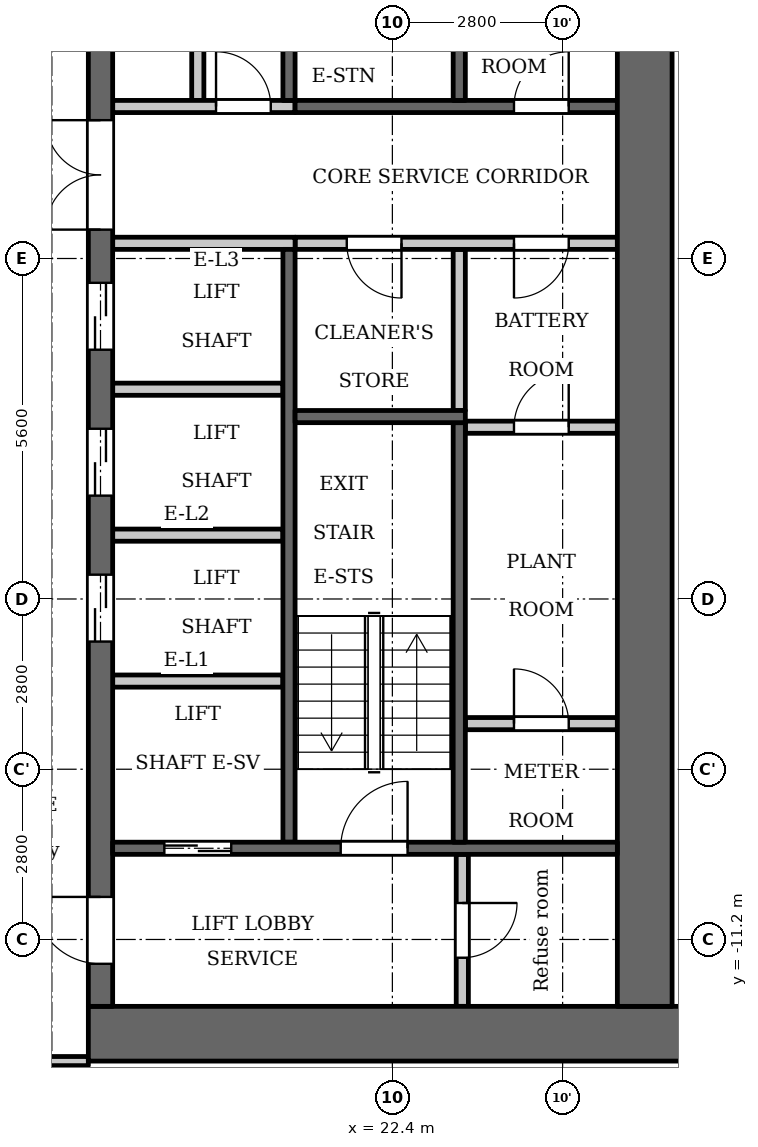
"""IFC4 building model, lengths in metres.
Left out: names, types, materials, properties, quantities, classifications, styles, units other than length and angle.
Written with IfcOpenShell. Run it as: python <this file> out.ifc"""

import sys

from ifc_helpers import new_model, si_unit, direction, frame, frame_2d, origin, place, context, subcontext, project, spatial, rectangle, extrude, element, fill, save


model = new_model("IFC4")
c1 = context("Model", 3, precision=1e-05, world=origin(), true_north=direction((0.0, 1.0)))
c2 = subcontext(c1, "Body", "Model", "MODEL_VIEW")
j1 = project(units=[si_unit("LENGTHUNIT", "METRE"), si_unit("PLANEANGLEUNIT", "RADIAN")], contexts=[c1])
p1 = place(None, origin())
s1 = spatial("IfcSite", under=j1, at=p1, CompositionType="ELEMENT")
p2 = place(p1, origin())
s2 = spatial("IfcBuilding", under=s1, at=p2, CompositionType="ELEMENT")
p3 = place(p2, frame((0.0, 0.0, 44.5)))
s3 = spatial("IfcBuildingStorey", under=s2, at=p3, CompositionType="ELEMENT", Elevation=44.5)
p4 = place(p3, frame((23.5, -2.5, 0.0), z_axis=(0.0, 0.0, 1.0), x_axis=(0.0, 1.0, 0.0)))
e1 = element("IfcWall", 1, at=p4, inside=s3, PredefinedType="PARTITIONING", context=c2, shape_type="SweptSolid", body=[
    extrude(rectangle(XDim=2.65, YDim=0.2, at=frame_2d((1.325, 0.0))), origin(), (0.0, 0.0, 1.0), 3.2),
])
p5 = place(p3, frame((20.7, 2.6, 0.0), z_axis=(0.0, 0.0, 1.0), x_axis=(0.0, 1.0, 0.0)))
e2 = element("IfcWall", 2, at=p5, inside=s3, PredefinedType="SHEAR", context=c2, shape_type="SweptSolid", body=[
    extrude(rectangle(XDim=7.0, YDim=0.2, at=frame_2d((3.5, 0.0))), origin(), (0.0, 0.0, 1.0), 3.2),
])
p6 = place(p3, frame((20.7, -9.6, 0.0), z_axis=(0.0, 0.0, 1.0), x_axis=(0.0, 1.0, 0.0)))
e3 = element("IfcWall", 3, at=p6, inside=s3, PredefinedType="SHEAR", context=c2, shape_type="SweptSolid", body=[
    extrude(rectangle(XDim=9.75, YDim=0.2, at=frame_2d((4.875, 0.0))), origin(), (0.0, 0.0, 1.0), 3.2),
])
p7 = place(p3, frame((20.8, 2.5, 0.0), z_axis=(0.0, 0.0, 1.0), x_axis=(1.0, 0.0, 0.0)))
e4 = element("IfcWall", 4, at=p7, inside=s3, PredefinedType="SHEAR", context=c2, shape_type="SweptSolid", body=[
    extrude(rectangle(XDim=5.3, YDim=0.2, at=frame_2d((2.65, 0.0))), origin(), (0.0, 0.0, 1.0), 3.2),
])
p8 = place(p7, frame((3.6, 0.0, 0.0)))
e5 = element("IfcOpeningElement", 5, at=p8, cuts=e4, PredefinedType="OPENING", context=c2, shape_type="SweptSolid", body=[
    extrude(rectangle(XDim=0.9, YDim=2.1, at=frame_2d((0.45, 1.05))), frame((0.0, 0.11, 0.0), z_axis=(0.0, -1.0, 0.0), x_axis=(1.0, 0.0, 0.0)), (0.0, 0.0, 1.0), 0.22),
])
p9 = place(p3, frame((20.8, 0.25, 0.0), z_axis=(0.0, 0.0, 1.0), x_axis=(1.0, 0.0, 0.0)))
e6 = element("IfcWall", 6, at=p9, inside=s3, PredefinedType="PARTITIONING", context=c2, shape_type="SweptSolid", body=[
    extrude(rectangle(XDim=5.3, YDim=0.2, at=frame_2d((2.65, 0.0))), origin(), (0.0, 0.0, 1.0), 3.2),
])
p10 = place(p9, frame((0.85, 0.0, 0.0)))
e7 = element("IfcOpeningElement", 7, at=p10, cuts=e6, PredefinedType="OPENING", context=c2, shape_type="SweptSolid", body=[
    extrude(rectangle(XDim=0.9, YDim=2.1, at=frame_2d((0.45, 1.05))), frame((0.0, 0.11, 0.0), z_axis=(0.0, -1.0, 0.0), x_axis=(1.0, 0.0, 0.0)), (0.0, 0.0, 1.0), 0.22),
])
p11 = place(p9, frame((3.6, 0.0, 0.0)))
e8 = element("IfcOpeningElement", 8, at=p11, cuts=e6, PredefinedType="OPENING", context=c2, shape_type="SweptSolid", body=[
    extrude(rectangle(XDim=0.9, YDim=2.1, at=frame_2d((0.45, 1.05))), frame((0.0, 0.11, 0.0), z_axis=(0.0, -1.0, 0.0), x_axis=(1.0, 0.0, 0.0)), (0.0, 0.0, 1.0), 0.22),
])
p12 = place(p3, frame((17.4, -12.75, 0.0), z_axis=(0.0, 0.0, 1.0), x_axis=(1.0, 0.0, 0.0)))
e9 = element("IfcWall", 9, at=p12, inside=s3, PredefinedType="SHEAR", context=c2, shape_type="SweptSolid", body=[
    extrude(rectangle(XDim=10.4, YDim=0.9, at=frame_2d((5.2, 0.0))), origin(), (0.0, 0.0, 1.0), 3.2),
])
p13 = place(p3, frame((19.2, 2.6, 0.0), z_axis=(0.0, 0.0, 1.0), x_axis=(0.0, 1.0, 0.0)))
e10 = element("IfcWall", 10, at=p13, inside=s3, PredefinedType="PARTITIONING", context=c2, shape_type="SweptSolid", body=[
    extrude(rectangle(XDim=4.6, YDim=0.2, at=frame_2d((2.3, 0.0))), origin(), (0.0, 0.0, 1.0), 3.2),
])
p14 = place(p3, frame((17.6, -12.3, 0.0), z_axis=(0.0, 0.0, 1.0), x_axis=(0.0, 1.0, 0.0)))
e11 = element("IfcWall", 11, at=p14, inside=s3, PredefinedType="SHEAR", context=c2, shape_type="SweptSolid", body=[
    extrude(rectangle(XDim=24.6, YDim=0.4, at=frame_2d((12.3, 0.0))), origin(), (0.0, 0.0, 1.0), 3.2),
])
p15 = place(p14, frame((6.0, 0.0, 0.0)))
e12 = element("IfcOpeningElement", 12, at=p15, cuts=e11, PredefinedType="OPENING", context=c2, shape_type="SweptSolid", body=[
    extrude(rectangle(XDim=1.1, YDim=2.1, at=frame_2d((0.55, 1.05))), frame((0.0, 0.21, 0.0), z_axis=(0.0, -1.0, 0.0), x_axis=(1.0, 0.0, 0.0)), (0.0, 0.0, 1.0), 0.42),
])
p16 = place(p14, frame((8.4, 0.0, 0.0)))
e13 = element("IfcOpeningElement", 13, at=p16, cuts=e11, PredefinedType="OPENING", context=c2, shape_type="SweptSolid", body=[
    extrude(rectangle(XDim=1.1, YDim=2.1, at=frame_2d((0.55, 1.05))), frame((0.0, 0.21, 0.0), z_axis=(0.0, -1.0, 0.0), x_axis=(1.0, 0.0, 0.0)), (0.0, 0.0, 1.0), 0.42),
])
p17 = place(p14, frame((10.8, 0.0, 0.0)))
e14 = element("IfcOpeningElement", 14, at=p17, cuts=e11, PredefinedType="OPENING", context=c2, shape_type="SweptSolid", body=[
    extrude(rectangle(XDim=1.1, YDim=2.1, at=frame_2d((0.55, 1.05))), frame((0.0, 0.21, 0.0), z_axis=(0.0, -1.0, 0.0), x_axis=(1.0, 0.0, 0.0)), (0.0, 0.0, 1.0), 0.42),
])
p18 = place(p14, frame((16.75, 0.0, 0.0)))
e15 = element("IfcOpeningElement", 15, at=p18, cuts=e11, PredefinedType="OPENING", context=c2, shape_type="SweptSolid", body=[
    extrude(rectangle(XDim=0.9, YDim=2.1, at=frame_2d((0.45, 1.05))), frame((0.0, 0.21, 0.0), z_axis=(0.0, -1.0, 0.0), x_axis=(1.0, 0.0, 0.0)), (0.0, 0.0, 1.0), 0.42),
])
p19 = place(p14, frame((22.8, 0.0, 0.0)))
e16 = element("IfcOpeningElement", 16, at=p19, cuts=e11, PredefinedType="OPENING", context=c2, shape_type="SweptSolid", body=[
    extrude(rectangle(XDim=1.1, YDim=2.1, at=frame_2d((0.55, 1.05))), frame((0.0, 0.21, 0.0), z_axis=(0.0, -1.0, 0.0), x_axis=(1.0, 0.0, 0.0)), (0.0, 0.0, 1.0), 0.42),
])
p20 = place(p14, frame((0.7, 0.0, 0.0)))
e17 = element("IfcOpeningElement", 17, at=p20, cuts=e11, PredefinedType="OPENING", context=c2, shape_type="SweptSolid", body=[
    extrude(rectangle(XDim=1.1, YDim=2.1, at=frame_2d((0.55, 1.05))), frame((0.0, 0.21, 0.0), z_axis=(0.0, -1.0, 0.0), x_axis=(1.0, 0.0, 0.0)), (0.0, 0.0, 1.0), 0.42),
])
p21 = place(p14, frame((12.775, 0.0, 0.0)))
e18 = element("IfcOpeningElement", 18, at=p21, cuts=e11, PredefinedType="OPENING", context=c2, shape_type="SweptSolid", body=[
    extrude(rectangle(XDim=1.8, YDim=2.1, at=frame_2d((0.9, 1.05))), frame((0.0, 0.21, 0.0), z_axis=(0.0, -1.0, 0.0), x_axis=(1.0, 0.0, 0.0)), (0.0, 0.0, 1.0), 0.42),
])
p22 = place(p3, frame((26.55, -12.3, 0.0), z_axis=(0.0, 0.0, 1.0), x_axis=(0.0, 1.0, 0.0)))
e19 = element("IfcWall", 19, at=p22, inside=s3, PredefinedType="SHEAR", context=c2, shape_type="SweptSolid", body=[
    extrude(rectangle(XDim=24.6, YDim=0.9, at=frame_2d((12.3, 0.0))), origin(), (0.0, 0.0, 1.0), 3.2),
])
p23 = place(p3, frame((23.55, -12.3, 0.0), z_axis=(0.0, 0.0, 1.0), x_axis=(0.0, 1.0, 0.0)))
e20 = element("IfcWall", 20, at=p23, inside=s3, PredefinedType="PARTITIONING", context=c2, shape_type="SweptSolid", body=[
    extrude(rectangle(XDim=2.5, YDim=0.2, at=frame_2d((1.25, 0.0))), origin(), (0.0, 0.0, 1.0), 3.2),
])
p24 = place(p23, frame((0.8, 0.0, 0.0)))
e21 = element("IfcOpeningElement", 21, at=p24, cuts=e20, PredefinedType="OPENING", context=c2, shape_type="SweptSolid", body=[
    extrude(rectangle(XDim=0.9, YDim=2.1, at=frame_2d((0.45, 1.05))), frame((0.0, 0.11, 0.0), z_axis=(0.0, -1.0, 0.0), x_axis=(1.0, 0.0, 0.0)), (0.0, 0.0, 1.0), 0.22),
])
p25 = place(p3, frame((23.6, -7.65, 0.0), z_axis=(0.0, 0.0, 1.0), x_axis=(1.0, 0.0, 0.0)))
e22 = element("IfcWall", 22, at=p25, inside=s3, PredefinedType="PARTITIONING", context=c2, shape_type="SweptSolid", body=[
    extrude(rectangle(XDim=2.5, YDim=0.2, at=frame_2d((1.25, 0.0))), origin(), (0.0, 0.0, 1.0), 3.2),
])
p26 = place(p25, frame((0.8, 0.0, 0.0)))
e23 = element("IfcOpeningElement", 23, at=p26, cuts=e22, PredefinedType="OPENING", context=c2, shape_type="SweptSolid", body=[
    extrude(rectangle(XDim=0.9, YDim=2.1, at=frame_2d((0.45, 1.05))), frame((0.0, 0.11, 0.0), z_axis=(0.0, -1.0, 0.0), x_axis=(1.0, 0.0, 0.0)), (0.0, 0.0, 1.0), 0.22),
])
p27 = place(p3, frame((23.6, -2.775, 0.0), z_axis=(0.0, 0.0, 1.0), x_axis=(1.0, 0.0, 0.0)))
e24 = element("IfcWall", 24, at=p27, inside=s3, PredefinedType="PARTITIONING", context=c2, shape_type="SweptSolid", body=[
    extrude(rectangle(XDim=2.5, YDim=0.2, at=frame_2d((1.25, 0.0))), origin(), (0.0, 0.0, 1.0), 3.2),
])
p28 = place(p27, frame((0.8, 0.0, 0.0)))
e25 = element("IfcOpeningElement", 25, at=p28, cuts=e24, PredefinedType="OPENING", context=c2, shape_type="SweptSolid", body=[
    extrude(rectangle(XDim=0.9, YDim=2.1, at=frame_2d((0.45, 1.05))), frame((0.0, 0.11, 0.0), z_axis=(0.0, -1.0, 0.0), x_axis=(1.0, 0.0, 0.0)), (0.0, 0.0, 1.0), 0.22),
])
p29 = place(p3, frame((17.8, -9.7, 0.0), z_axis=(0.0, 0.0, 1.0), x_axis=(1.0, 0.0, 0.0)))
e26 = element("IfcWall", 26, at=p29, inside=s3, PredefinedType="SHEAR", context=c2, shape_type="SweptSolid", body=[
    extrude(rectangle(XDim=8.3, YDim=0.2, at=frame_2d((4.15, 0.0))), origin(), (0.0, 0.0, 1.0), 3.2),
])
p30 = place(p29, frame((0.85, 0.0, 0.0)))
e27 = element("IfcOpeningElement", 27, at=p30, cuts=e26, PredefinedType="OPENING", context=c2, shape_type="SweptSolid", body=[
    extrude(rectangle(XDim=1.1, YDim=2.1, at=frame_2d((0.55, 1.05))), frame((0.0, 0.11, 0.0), z_axis=(0.0, -1.0, 0.0), x_axis=(1.0, 0.0, 0.0)), (0.0, 0.0, 1.0), 0.22),
])
p31 = place(p29, frame((3.75, 0.0, 0.0)))
e28 = element("IfcOpeningElement", 28, at=p31, cuts=e26, PredefinedType="OPENING", context=c2, shape_type="SweptSolid", body=[
    extrude(rectangle(XDim=1.1, YDim=2.1, at=frame_2d((0.55, 1.05))), frame((0.0, 0.11, 0.0), z_axis=(0.0, -1.0, 0.0), x_axis=(1.0, 0.0, 0.0)), (0.0, 0.0, 1.0), 0.22),
])
for number, where, z_axis, x_axis in (
    (29, (17.8, -6.95, 0.0), (0.0, 0.0, 1.0), (1.0, 0.0, 0.0)),
    (30, (17.8, -4.55, 0.0), (0.0, 0.0, 1.0), (1.0, 0.0, 0.0)),
    (31, (17.8, -2.15, 0.0), (0.0, 0.0, 1.0), (1.0, 0.0, 0.0)),
):
    element("IfcWall", number, at=place(p3, frame(where, z_axis=z_axis, x_axis=x_axis)), inside=s3, PredefinedType="PARTITIONING", context=c2, shape_type="SweptSolid", body=[
        extrude(rectangle(XDim=2.8, YDim=0.2, at=frame_2d((1.4, 0.0))), origin(), (0.0, 0.0, 1.0), 3.2),
    ])
p32 = place(p3, frame((17.8, 0.25, 0.0), z_axis=(0.0, 0.0, 1.0), x_axis=(1.0, 0.0, 0.0)))
e32 = element("IfcWall", 32, at=p32, inside=s3, PredefinedType="PARTITIONING", context=c2, shape_type="SweptSolid", body=[
    extrude(rectangle(XDim=3.0, YDim=0.2, at=frame_2d((1.5, 0.0))), origin(), (0.0, 0.0, 1.0), 3.2),
])
p33 = place(p3, frame((17.8, 2.5, 0.0), z_axis=(0.0, 0.0, 1.0), x_axis=(1.0, 0.0, 0.0)))
e33 = element("IfcWall", 33, at=p33, inside=s3, PredefinedType="PARTITIONING", context=c2, shape_type="SweptSolid", body=[
    extrude(rectangle(XDim=3.0, YDim=0.2, at=frame_2d((1.5, 0.0))), origin(), (0.0, 0.0, 1.0), 3.2),
])
p34 = place(p33, frame((1.7, 0.0, 0.0)))
e34 = element("IfcOpeningElement", 34, at=p34, cuts=e33, PredefinedType="OPENING", context=c2, shape_type="SweptSolid", body=[
    extrude(rectangle(XDim=0.9, YDim=2.1, at=frame_2d((0.45, 1.05))), frame((0.0, 0.11, 0.0), z_axis=(0.0, -1.0, 0.0), x_axis=(1.0, 0.0, 0.0)), (0.0, 0.0, 1.0), 0.22),
])
p35 = place(p3, frame((23.5, 2.6, 0.0), z_axis=(0.0, 0.0, 1.0), x_axis=(0.0, 1.0, 0.0)))
e35 = element("IfcWall", 35, at=p35, inside=s3, PredefinedType="SHEAR", context=c2, shape_type="SweptSolid", body=[
    extrude(rectangle(XDim=7.0, YDim=0.2, at=frame_2d((3.5, 0.0))), origin(), (0.0, 0.0, 1.0), 3.2),
])
p36 = place(p3, frame((23.5, -9.6, 0.0), z_axis=(0.0, 0.0, 1.0), x_axis=(0.0, 1.0, 0.0)))
e36 = element("IfcWall", 36, at=p36, inside=s3, PredefinedType="SHEAR", context=c2, shape_type="SweptSolid", body=[
    extrude(rectangle(XDim=6.9, YDim=0.2, at=frame_2d((3.45, 0.0))), origin(), (0.0, 0.0, 1.0), 3.2),
])
p37 = place(p3, frame((20.8, -2.6, 0.0), z_axis=(0.0, 0.0, 1.0), x_axis=(1.0, 0.0, 0.0)))
e37 = element("IfcWall", 37, at=p37, inside=s3, PredefinedType="SHEAR", context=c2, shape_type="SweptSolid", body=[
    extrude(rectangle(XDim=2.8, YDim=0.2, at=frame_2d((1.4, 0.0))), origin(), (0.0, 0.0, 1.0), 3.2),
])
p38 = place(p3, frame((-17.4, -13.2, 0.0), z_axis=(0.0, 0.0, 1.0), x_axis=(1.0, 0.0, 0.0)))
e38 = element("IfcWall", 38, at=p38, inside=s3, PredefinedType="PARTITIONING", context=c2, shape_type="SweptSolid", body=[
    extrude(rectangle(XDim=34.8, YDim=0.15, at=frame_2d((17.4, 0.0))), origin(), (0.0, 0.0, 1.0), 3.2),
])
p39 = place(p38, frame((0.65, 0.0, 0.0)))
e39 = element("IfcOpeningElement", 39, at=p39, cuts=e38, PredefinedType="OPENING", context=c2, shape_type="SweptSolid", body=[
    extrude(rectangle(XDim=1.0, YDim=2.1, at=frame_2d((0.5, 1.05))), frame((0.0, 0.085, 0.0), z_axis=(0.0, -1.0, 0.0), x_axis=(1.0, 0.0, 0.0)), (0.0, 0.0, 1.0), 0.17),
])
p40 = place(p38, frame((33.05, 0.0, 0.0)))
e40 = element("IfcOpeningElement", 40, at=p40, cuts=e38, PredefinedType="OPENING", context=c2, shape_type="SweptSolid", body=[
    extrude(rectangle(XDim=1.0, YDim=2.1, at=frame_2d((0.5, 1.05))), frame((0.0, 0.085, 0.0), z_axis=(0.0, -1.0, 0.0), x_axis=(1.0, 0.0, 0.0)), (0.0, 0.0, 1.0), 0.17),
])
p41 = place(p38, frame((4.55, 0.0, 0.0)))
e41 = element("IfcOpeningElement", 41, at=p41, cuts=e38, PredefinedType="OPENING", context=c2, shape_type="SweptSolid", body=[
    extrude(rectangle(XDim=1.0, YDim=2.1, at=frame_2d((0.5, 1.05))), frame((0.0, 0.085, 0.0), z_axis=(0.0, -1.0, 0.0), x_axis=(1.0, 0.0, 0.0)), (0.0, 0.0, 1.0), 0.17),
])
p42 = place(p38, frame((6.9, 0.0, 0.0)))
e42 = element("IfcOpeningElement", 42, at=p42, cuts=e38, PredefinedType="OPENING", context=c2, shape_type="SweptSolid", body=[
    extrude(rectangle(XDim=1.0, YDim=2.1, at=frame_2d((0.5, 1.05))), frame((0.0, 0.085, 0.0), z_axis=(0.0, -1.0, 0.0), x_axis=(1.0, 0.0, 0.0)), (0.0, 0.0, 1.0), 0.17),
])
p43 = place(p38, frame((15.75, 0.0, 0.0)))
e43 = element("IfcOpeningElement", 43, at=p43, cuts=e38, PredefinedType="OPENING", context=c2, shape_type="SweptSolid", body=[
    extrude(rectangle(XDim=1.0, YDim=2.1, at=frame_2d((0.5, 1.05))), frame((0.0, 0.085, 0.0), z_axis=(0.0, -1.0, 0.0), x_axis=(1.0, 0.0, 0.0)), (0.0, 0.0, 1.0), 0.17),
])
p44 = place(p38, frame((18.1, 0.0, 0.0)))
e44 = element("IfcOpeningElement", 44, at=p44, cuts=e38, PredefinedType="OPENING", context=c2, shape_type="SweptSolid", body=[
    extrude(rectangle(XDim=1.0, YDim=2.1, at=frame_2d((0.5, 1.05))), frame((0.0, 0.085, 0.0), z_axis=(0.0, -1.0, 0.0), x_axis=(1.0, 0.0, 0.0)), (0.0, 0.0, 1.0), 0.17),
])
p45 = place(p38, frame((26.95, 0.0, 0.0)))
e45 = element("IfcOpeningElement", 45, at=p45, cuts=e38, PredefinedType="OPENING", context=c2, shape_type="SweptSolid", body=[
    extrude(rectangle(XDim=1.0, YDim=2.1, at=frame_2d((0.5, 1.05))), frame((0.0, 0.085, 0.0), z_axis=(0.0, -1.0, 0.0), x_axis=(1.0, 0.0, 0.0)), (0.0, 0.0, 1.0), 0.17),
])
p46 = place(p38, frame((29.25, 0.0, 0.0)))
e46 = element("IfcOpeningElement", 46, at=p46, cuts=e38, PredefinedType="OPENING", context=c2, shape_type="SweptSolid", body=[
    extrude(rectangle(XDim=1.0, YDim=2.1, at=frame_2d((0.5, 1.05))), frame((0.0, 0.085, 0.0), z_axis=(0.0, -1.0, 0.0), x_axis=(1.0, 0.0, 0.0)), (0.0, 0.0, 1.0), 0.17),
])
p47 = place(p30, origin())
e47 = element("IfcDoor", 47, at=p47, inside=s3, OperationType="DOUBLE_DOOR_SLIDING", PredefinedType="DOOR", context=c2, shape_type="SweptSolid", body=[
    extrude(rectangle(XDim=1.1, YDim=2.1, at=frame_2d((0.55, 1.05))), frame((0.0, 0.025, 0.0), z_axis=(0.0, -1.0, 0.0), x_axis=(1.0, 0.0, 0.0)), (0.0, 0.0, 1.0), 0.05),
])
fill(e27, e47)
p48 = place(p15, origin())
e48 = element("IfcDoor", 48, at=p48, inside=s3, OperationType="DOUBLE_DOOR_SLIDING", PredefinedType="DOOR", context=c2, shape_type="SweptSolid", body=[
    extrude(rectangle(XDim=1.1, YDim=2.1, at=frame_2d((0.55, 1.05))), frame((0.0, 0.025, 0.0), z_axis=(0.0, -1.0, 0.0), x_axis=(1.0, 0.0, 0.0)), (0.0, 0.0, 1.0), 0.05),
])
fill(e12, e48)
p49 = place(p16, origin())
e49 = element("IfcDoor", 49, at=p49, inside=s3, OperationType="DOUBLE_DOOR_SLIDING", PredefinedType="DOOR", context=c2, shape_type="SweptSolid", body=[
    extrude(rectangle(XDim=1.1, YDim=2.1, at=frame_2d((0.55, 1.05))), frame((0.0, 0.025, 0.0), z_axis=(0.0, -1.0, 0.0), x_axis=(1.0, 0.0, 0.0)), (0.0, 0.0, 1.0), 0.05),
])
fill(e13, e49)
p50 = place(p17, origin())
e50 = element("IfcDoor", 50, at=p50, inside=s3, OperationType="DOUBLE_DOOR_SLIDING", PredefinedType="DOOR", context=c2, shape_type="SweptSolid", body=[
    extrude(rectangle(XDim=1.1, YDim=2.1, at=frame_2d((0.55, 1.05))), frame((0.0, 0.025, 0.0), z_axis=(0.0, -1.0, 0.0), x_axis=(1.0, 0.0, 0.0)), (0.0, 0.0, 1.0), 0.05),
])
fill(e14, e50)
p51 = place(p34, origin())
e51 = element("IfcDoor", 51, at=p51, inside=s3, OperationType="SINGLE_SWING_RIGHT", PredefinedType="DOOR", context=c2, shape_type="SweptSolid", body=[
    extrude(rectangle(XDim=0.9, YDim=2.1, at=frame_2d((0.45, 1.05))), frame((0.0, 0.025, 0.0), z_axis=(0.0, -1.0, 0.0), x_axis=(1.0, 0.0, 0.0)), (0.0, 0.0, 1.0), 0.05),
])
fill(e34, e51)
p52 = place(p20, origin())
e52 = element("IfcDoor", 52, at=p52, inside=s3, OperationType="SINGLE_SWING_LEFT", PredefinedType="DOOR", context=c2, shape_type="SweptSolid", body=[
    extrude(rectangle(XDim=1.1, YDim=2.1, at=frame_2d((0.55, 1.05))), frame((0.0, 0.025, 0.0), z_axis=(0.0, -1.0, 0.0), x_axis=(1.0, 0.0, 0.0)), (0.0, 0.0, 1.0), 0.05),
])
fill(e17, e52)
p53 = place(p24, origin())
e53 = element("IfcDoor", 53, at=p53, inside=s3, OperationType="SINGLE_SWING_RIGHT", PredefinedType="DOOR", context=c2, shape_type="SweptSolid", body=[
    extrude(rectangle(XDim=0.9, YDim=2.1, at=frame_2d((0.45, 1.05))), frame((0.0, 0.025, 0.0), z_axis=(0.0, -1.0, 0.0), x_axis=(1.0, 0.0, 0.0)), (0.0, 0.0, 1.0), 0.05),
])
fill(e21, e53)
p54 = place(p31, origin())
e54 = element("IfcDoor", 54, at=p54, inside=s3, OperationType="SINGLE_SWING_LEFT", PredefinedType="DOOR", context=c2, shape_type="SweptSolid", body=[
    extrude(rectangle(XDim=1.1, YDim=2.1, at=frame_2d((0.55, 1.05))), frame((0.0, 0.025, 0.0), z_axis=(0.0, -1.0, 0.0), x_axis=(1.0, 0.0, 0.0)), (0.0, 0.0, 1.0), 0.05),
])
fill(e28, e54)
p55 = place(p21, origin())
e55 = element("IfcDoor", 55, at=p55, inside=s3, OperationType="DOUBLE_DOOR_SINGLE_SWING", PredefinedType="DOOR", context=c2, shape_type="SweptSolid", body=[
    extrude(rectangle(XDim=1.8, YDim=2.1, at=frame_2d((0.9, 1.05))), frame((0.0, 0.025, 0.0), z_axis=(0.0, -1.0, 0.0), x_axis=(1.0, 0.0, 0.0)), (0.0, 0.0, 1.0), 0.05),
])
fill(e18, e55)
p56 = place(p10, origin())
e56 = element("IfcDoor", 56, at=p56, inside=s3, OperationType="SINGLE_SWING_RIGHT", PredefinedType="DOOR", context=c2, shape_type="SweptSolid", body=[
    extrude(rectangle(XDim=0.9, YDim=2.1, at=frame_2d((0.45, 1.05))), frame((0.0, 0.025, 0.0), z_axis=(0.0, -1.0, 0.0), x_axis=(1.0, 0.0, 0.0)), (0.0, 0.0, 1.0), 0.05),
])
fill(e7, e56)
p57 = place(p26, origin())
e57 = element("IfcDoor", 57, at=p57, inside=s3, OperationType="SINGLE_SWING_RIGHT", PredefinedType="DOOR", context=c2, shape_type="SweptSolid", body=[
    extrude(rectangle(XDim=0.9, YDim=2.1, at=frame_2d((0.45, 1.05))), frame((0.0, 0.025, 0.0), z_axis=(0.0, -1.0, 0.0), x_axis=(1.0, 0.0, 0.0)), (0.0, 0.0, 1.0), 0.05),
])
fill(e23, e57)
p58 = place(p28, origin())
e58 = element("IfcDoor", 58, at=p58, inside=s3, OperationType="SINGLE_SWING_LEFT", PredefinedType="DOOR", context=c2, shape_type="SweptSolid", body=[
    extrude(rectangle(XDim=0.9, YDim=2.1, at=frame_2d((0.45, 1.05))), frame((0.0, 0.025, 0.0), z_axis=(0.0, -1.0, 0.0), x_axis=(1.0, 0.0, 0.0)), (0.0, 0.0, 1.0), 0.05),
])
fill(e25, e58)
p59 = place(p11, origin())
e59 = element("IfcDoor", 59, at=p59, inside=s3, OperationType="SINGLE_SWING_LEFT", PredefinedType="DOOR", context=c2, shape_type="SweptSolid", body=[
    extrude(rectangle(XDim=0.9, YDim=2.1, at=frame_2d((0.45, 1.05))), frame((0.0, 0.025, 0.0), z_axis=(0.0, -1.0, 0.0), x_axis=(1.0, 0.0, 0.0)), (0.0, 0.0, 1.0), 0.05),
])
fill(e8, e59)
p60 = place(p8, origin())
e60 = element("IfcDoor", 60, at=p60, inside=s3, OperationType="SINGLE_SWING_LEFT", PredefinedType="DOOR", context=c2, shape_type="SweptSolid", body=[
    extrude(rectangle(XDim=0.9, YDim=2.1, at=frame_2d((0.45, 1.05))), frame((0.0, 0.025, 0.0), z_axis=(0.0, -1.0, 0.0), x_axis=(1.0, 0.0, 0.0)), (0.0, 0.0, 1.0), 0.05),
])
fill(e5, e60)
save(model, sys.argv[1])
